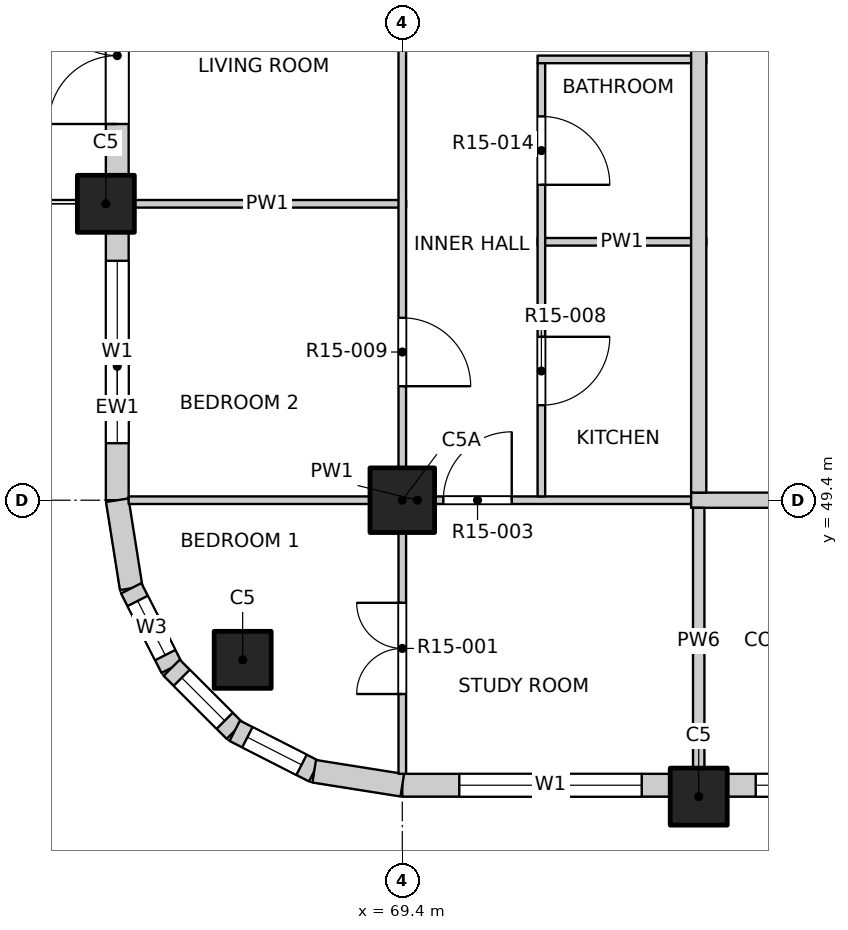
"""IFC4 building model, lengths in metres.
Left out: names, types, materials, properties, quantities, classifications, styles, units other than length and angle.
Written with IfcOpenShell. Run it as: python <this file> out.ifc"""

import sys

from ifc_helpers import new_model, si_unit, direction, frame, frame_2d, origin, origin_2d, place, context, subcontext, project, spatial, rectangle, extrude, element, fill, save


model = new_model("IFC4")
c1 = context("Model", 3, precision=1e-05, world=origin(), true_north=direction((0.0, 1.0)))
c2 = subcontext(c1, "Body", "Model", "MODEL_VIEW")
j1 = project(units=[si_unit("LENGTHUNIT", "METRE"), si_unit("PLANEANGLEUNIT", "RADIAN")], contexts=[c1])
p1 = place(None, origin())
s1 = spatial("IfcSite", under=j1, at=p1, CompositionType="ELEMENT")
p2 = place(p1, origin())
s2 = spatial("IfcBuilding", under=s1, at=p2, CompositionType="ELEMENT")
p3 = place(p2, frame((0.0, 0.0, 158.8)))
s3 = spatial("IfcBuildingStorey", under=s2, at=p3, CompositionType="ELEMENT", Elevation=158.8)
for number, where, z_axis, x_axis in (
    (1, (67.3, 47.3, -0.25), (0.0, 0.0, 1.0), (1.0, 0.0, 0.0)),
    (2, (65.5, 53.3, -0.25), (0.0, 0.0, 1.0), (1.0, 0.0, 0.0)),
    (3, (73.3, 45.5, -0.25), (0.0, 0.0, 1.0), (1.0, 0.0, 0.0)),
):
    element("IfcColumn", number, at=place(p3, frame(where, z_axis=z_axis, x_axis=x_axis)), inside=s3, PredefinedType="COLUMN", context=c2, shape_type="SweptSolid", body=[
        extrude(rectangle(XDim=0.75, YDim=0.75, at=origin_2d()), origin(), (0.0, 0.0, 1.0), 3.4),
    ])
p4 = place(p3, frame((69.4, 49.4, -0.25), z_axis=(0.0, 0.0, 1.0), x_axis=(1.0, 0.0, 0.0)))
e4 = element("IfcColumn", 4, at=p4, inside=s3, PredefinedType="COLUMN", context=c2, shape_type="SweptSolid", body=[
    extrude(rectangle(XDim=0.85, YDim=0.85, at=origin_2d()), origin(), (0.0, 0.0, 1.0), 3.4),
])
p5 = place(p3, frame((69.4, 45.65, 0.0), z_axis=(0.0, 0.0, 1.0), x_axis=(1.0, 0.0, 0.0)))
e5 = element("IfcWall", 5, at=p5, inside=s3, PredefinedType="SOLIDWALL", context=c2, shape_type="SweptSolid", body=[
    extrude(rectangle(XDim=3.525, YDim=0.3, at=frame_2d((1.763, 0.0))), origin(), (0.0, 0.0, 1.0), 2.7),
])
p6 = place(p5, frame((0.75, 0.0, 0.9)))
e6 = element("IfcOpeningElement", 6, at=p6, cuts=e5, PredefinedType="OPENING", context=c2, shape_type="SweptSolid", body=[
    extrude(rectangle(XDim=2.4, YDim=1.8, at=frame_2d((1.2, 0.9))), frame((0.0, 0.16, 0.0), z_axis=(0.0, -1.0, 0.0), x_axis=(1.0, 0.0, 0.0)), (0.0, 0.0, 1.0), 0.32),
])
p7 = place(p3, frame((73.675, 45.65, 0.0), z_axis=(0.0, 0.0, 1.0), x_axis=(1.0, 0.0, 0.0)))
e7 = element("IfcWall", 7, at=p7, inside=s3, PredefinedType="SOLIDWALL", context=c2, shape_type="SweptSolid", body=[
    extrude(rectangle(XDim=7.05, YDim=0.3, at=frame_2d((3.525, 0.0))), origin(), (0.0, 0.0, 1.0), 2.7),
])
p8 = place(p7, frame((0.375, 0.0, 0.9)))
e8 = element("IfcOpeningElement", 8, at=p8, cuts=e7, PredefinedType="OPENING", context=c2, shape_type="SweptSolid", body=[
    extrude(rectangle(XDim=2.4, YDim=1.8, at=frame_2d((1.2, 0.9))), frame((0.0, 0.16, 0.0), z_axis=(0.0, -1.0, 0.0), x_axis=(1.0, 0.0, 0.0)), (0.0, 0.0, 1.0), 0.32),
])
p9 = place(p7, frame((4.275, 0.0, 0.9)))
e9 = element("IfcOpeningElement", 9, at=p9, cuts=e7, PredefinedType="OPENING", context=c2, shape_type="SweptSolid", body=[
    extrude(rectangle(XDim=2.4, YDim=1.8, at=frame_2d((1.2, 0.9))), frame((0.0, 0.16, 0.0), z_axis=(0.0, -1.0, 0.0), x_axis=(1.0, 0.0, 0.0)), (0.0, 0.0, 1.0), 0.32),
])
p10 = place(p3, frame((65.65, 49.4, 0.0), z_axis=(0.0, 0.0, 1.0), x_axis=(0.0, 1.0, 0.0)))
e10 = element("IfcWall", 10, at=p10, inside=s3, PredefinedType="SOLIDWALL", context=c2, shape_type="SweptSolid", body=[
    extrude(rectangle(XDim=3.525, YDim=0.3, at=frame_2d((1.763, 0.0))), origin(), (0.0, 0.0, 1.0), 2.7),
])
p11 = place(p10, frame((0.75, 0.0, 0.9)))
e11 = element("IfcOpeningElement", 11, at=p11, cuts=e10, PredefinedType="OPENING", context=c2, shape_type="SweptSolid", body=[
    extrude(rectangle(XDim=2.4, YDim=1.8, at=frame_2d((1.2, 0.9))), frame((0.0, 0.16, 0.0), z_axis=(0.0, -1.0, 0.0), x_axis=(1.0, 0.0, 0.0)), (0.0, 0.0, 1.0), 0.32),
])
p12 = place(p3, frame((65.65, 53.675, 0.0), z_axis=(0.0, 0.0, 1.0), x_axis=(0.0, 1.0, 0.0)))
e12 = element("IfcWall", 12, at=p12, inside=s3, PredefinedType="SOLIDWALL", context=c2, shape_type="SweptSolid", body=[
    extrude(rectangle(XDim=7.05, YDim=0.3, at=frame_2d((3.525, 0.0))), origin(), (0.0, 0.0, 1.0), 2.7),
])
p13 = place(p12, frame((0.675, 0.0, 0.0)))
e13 = element("IfcOpeningElement", 13, at=p13, cuts=e12, PredefinedType="OPENING", context=c2, shape_type="SweptSolid", body=[
    extrude(rectangle(XDim=1.8, YDim=2.4, at=frame_2d((0.9, 1.2))), frame((0.0, 0.16, 0.0), z_axis=(0.0, -1.0, 0.0), x_axis=(1.0, 0.0, 0.0)), (0.0, 0.0, 1.0), 0.32),
])
p14 = place(p12, frame((4.275, 0.0, 0.9)))
e14 = element("IfcOpeningElement", 14, at=p14, cuts=e12, PredefinedType="OPENING", context=c2, shape_type="SweptSolid", body=[
    extrude(rectangle(XDim=2.4, YDim=1.8, at=frame_2d((1.2, 0.9))), frame((0.0, 0.16, 0.0), z_axis=(0.0, -1.0, 0.0), x_axis=(1.0, 0.0, 0.0)), (0.0, 0.0, 1.0), 0.32),
])
p15 = place(p3, frame((65.65, 49.4, 0.0), z_axis=(0.0, 0.0, 1.0), x_axis=(0.156496880861, -0.987678452879, 0.0)))
e15 = element("IfcWall", 15, at=p15, inside=s3, PredefinedType="SOLIDWALL", context=c2, shape_type="SweptSolid", body=[
    extrude(rectangle(XDim=1.173, YDim=0.3, at=frame_2d((0.586, 0.0))), origin(), (0.0, 0.0, 1.0), 2.7),
])
p16 = place(p3, frame((65.833, 48.241, 0.0), z_axis=(0.0, 0.0, 1.0), x_axis=(0.454025524128, -0.890988677504, 0.0)))
e16 = element("IfcWall", 16, at=p16, inside=s3, PredefinedType="SOLIDWALL", context=c2, shape_type="SweptSolid", body=[
    extrude(rectangle(XDim=1.173, YDim=0.3, at=frame_2d((0.587, 0.0))), origin(), (0.0, 0.0, 1.0), 2.7),
])
p17 = place(p16, frame((0.187, 0.0, 0.9)))
e17 = element("IfcOpeningElement", 17, at=p17, cuts=e16, PredefinedType="OPENING", context=c2, shape_type="SweptSolid", body=[
    extrude(rectangle(XDim=0.8, YDim=1.2, at=frame_2d((0.4, 0.6))), frame((0.0, 0.16, 0.0), z_axis=(0.0, -1.0, 0.0), x_axis=(1.0, 0.0, 0.0)), (0.0, 0.0, 1.0), 0.32),
])
p18 = place(p3, frame((66.366, 47.196, 0.0), z_axis=(0.0, 0.0, 1.0), x_axis=(0.707106781187, -0.707106781187, 0.0)))
e18 = element("IfcWall", 18, at=p18, inside=s3, PredefinedType="SOLIDWALL", context=c2, shape_type="SweptSolid", body=[
    extrude(rectangle(XDim=1.173, YDim=0.3, at=frame_2d((0.586, 0.0))), origin(), (0.0, 0.0, 1.0), 2.7),
])
p19 = place(p18, frame((0.187, 0.0, 0.9)))
e19 = element("IfcOpeningElement", 19, at=p19, cuts=e18, PredefinedType="OPENING", context=c2, shape_type="SweptSolid", body=[
    extrude(rectangle(XDim=0.8, YDim=1.2, at=frame_2d((0.4, 0.6))), frame((0.0, 0.16, 0.0), z_axis=(0.0, -1.0, 0.0), x_axis=(1.0, 0.0, 0.0)), (0.0, 0.0, 1.0), 0.32),
])
p20 = place(p3, frame((67.196, 46.366, 0.0), z_axis=(0.0, 0.0, 1.0), x_axis=(0.890988677504, -0.454025524128, 0.0)))
e20 = element("IfcWall", 20, at=p20, inside=s3, PredefinedType="SOLIDWALL", context=c2, shape_type="SweptSolid", body=[
    extrude(rectangle(XDim=1.173, YDim=0.3, at=frame_2d((0.587, 0.0))), origin(), (0.0, 0.0, 1.0), 2.7),
])
p21 = place(p20, frame((0.187, 0.0, 0.9)))
e21 = element("IfcOpeningElement", 21, at=p21, cuts=e20, PredefinedType="OPENING", context=c2, shape_type="SweptSolid", body=[
    extrude(rectangle(XDim=0.8, YDim=1.2, at=frame_2d((0.4, 0.6))), frame((0.0, 0.16, 0.0), z_axis=(0.0, -1.0, 0.0), x_axis=(1.0, 0.0, 0.0)), (0.0, 0.0, 1.0), 0.32),
])
p22 = place(p3, frame((68.241, 45.833, 0.0), z_axis=(0.0, 0.0, 1.0), x_axis=(0.987678452879, -0.156496880861, 0.0)))
e22 = element("IfcWall", 22, at=p22, inside=s3, PredefinedType="SOLIDWALL", context=c2, shape_type="SweptSolid", body=[
    extrude(rectangle(XDim=1.173, YDim=0.3, at=frame_2d((0.586, 0.0))), origin(), (0.0, 0.0, 1.0), 2.7),
])
p23 = place(p3, frame((65.8, 49.4, 0.0), z_axis=(0.0, 0.0, 1.0), x_axis=(1.0, 0.0, 0.0)))
e23 = element("IfcWall", 23, at=p23, inside=s3, PredefinedType="PARTITIONING", context=c2, shape_type="SweptSolid", body=[
    extrude(rectangle(XDim=7.6, YDim=0.1, at=frame_2d((3.8, 0.0))), origin(), (0.0, 0.0, 1.0), 3.15),
])
p24 = place(p23, frame((4.14, 0.0, 0.0)))
e24 = element("IfcOpeningElement", 24, at=p24, cuts=e23, PredefinedType="OPENING", context=c2, shape_type="SweptSolid", body=[
    extrude(rectangle(XDim=0.9, YDim=2.1, at=frame_2d((0.45, 1.05))), frame((0.0, 0.06, 0.0), z_axis=(0.0, -1.0, 0.0), x_axis=(1.0, 0.0, 0.0)), (0.0, 0.0, 1.0), 0.12),
])
p25 = place(p3, frame((73.2, 49.4, 0.0), z_axis=(0.0, 0.0, 1.0), x_axis=(1.0, 0.0, 0.0)))
e25 = element("IfcWall", 25, at=p25, inside=s3, PredefinedType="PARTITIONING", context=c2, shape_type="SweptSolid", body=[
    extrude(rectangle(XDim=23.6, YDim=0.2, at=frame_2d((11.8, 0.0))), origin(), (0.0, 0.0, 1.0), 3.15),
])
p26 = place(p25, frame((4.525, 0.0, 0.0)))
e26 = element("IfcOpeningElement", 26, at=p26, cuts=e25, PredefinedType="OPENING", context=c2, shape_type="SweptSolid", body=[
    extrude(rectangle(XDim=1.2, YDim=2.1, at=frame_2d((0.6, 1.05))), frame((0.0, 0.11, 0.0), z_axis=(0.0, -1.0, 0.0), x_axis=(1.0, 0.0, 0.0)), (0.0, 0.0, 1.0), 0.22),
])
p27 = place(p25, frame((15.1, 0.0, 0.0)))
e27 = element("IfcOpeningElement", 27, at=p27, cuts=e25, PredefinedType="OPENING", context=c2, shape_type="SweptSolid", body=[
    extrude(rectangle(XDim=1.2, YDim=2.1, at=frame_2d((0.6, 1.05))), frame((0.0, 0.11, 0.0), z_axis=(0.0, -1.0, 0.0), x_axis=(1.0, 0.0, 0.0)), (0.0, 0.0, 1.0), 0.22),
])
p28 = place(p3, frame((71.18, 52.8, 0.0), z_axis=(0.0, 0.0, 1.0), x_axis=(1.0, 0.0, 0.0)))
e28 = element("IfcWall", 28, at=p28, inside=s3, PredefinedType="PARTITIONING", context=c2, shape_type="SweptSolid", body=[
    extrude(rectangle(XDim=2.22, YDim=0.1, at=frame_2d((1.11, 0.0))), origin(), (0.0, 0.0, 1.0), 3.15),
])
p29 = place(p3, frame((65.8, 53.3, 0.0), z_axis=(0.0, 0.0, 1.0), x_axis=(1.0, 0.0, 0.0)))
e29 = element("IfcWall", 29, at=p29, inside=s3, PredefinedType="PARTITIONING", context=c2, shape_type="SweptSolid", body=[
    extrude(rectangle(XDim=3.65, YDim=0.1, at=frame_2d((1.825, 0.0))), origin(), (0.0, 0.0, 1.0), 3.15),
])
p30 = place(p3, frame((71.18, 55.2, 0.0), z_axis=(0.0, 0.0, 1.0), x_axis=(1.0, 0.0, 0.0)))
e30 = element("IfcWall", 30, at=p30, inside=s3, PredefinedType="PARTITIONING", context=c2, shape_type="SweptSolid", body=[
    extrude(rectangle(XDim=2.22, YDim=0.1, at=frame_2d((1.11, 0.0))), origin(), (0.0, 0.0, 1.0), 3.15),
])
p31 = place(p3, frame((69.4, 45.8, 0.0), z_axis=(0.0, 0.0, 1.0), x_axis=(0.0, 1.0, 0.0)))
e31 = element("IfcWall", 31, at=p31, inside=s3, PredefinedType="PARTITIONING", context=c2, shape_type="SweptSolid", body=[
    extrude(rectangle(XDim=38.4, YDim=0.1, at=frame_2d((19.2, 0.0))), origin(), (0.0, 0.0, 1.0), 3.15),
])
p32 = place(p31, frame((1.05, 0.0, 0.0)))
e32 = element("IfcOpeningElement", 32, at=p32, cuts=e31, PredefinedType="OPENING", context=c2, shape_type="SweptSolid", body=[
    extrude(rectangle(XDim=1.2, YDim=2.1, at=frame_2d((0.6, 1.05))), frame((0.0, 0.06, 0.0), z_axis=(0.0, -1.0, 0.0), x_axis=(1.0, 0.0, 0.0)), (0.0, 0.0, 1.0), 0.12),
])
p33 = place(p31, frame((5.1, 0.0, 0.0)))
e33 = element("IfcOpeningElement", 33, at=p33, cuts=e31, PredefinedType="OPENING", context=c2, shape_type="SweptSolid", body=[
    extrude(rectangle(XDim=0.9, YDim=2.1, at=frame_2d((0.45, 1.05))), frame((0.0, 0.06, 0.0), z_axis=(0.0, -1.0, 0.0), x_axis=(1.0, 0.0, 0.0)), (0.0, 0.0, 1.0), 0.12),
])
p34 = place(p31, frame((11.925, 0.0, 0.0)))
e34 = element("IfcOpeningElement", 34, at=p34, cuts=e31, PredefinedType="OPENING", context=c2, shape_type="SweptSolid", body=[
    extrude(rectangle(XDim=1.2, YDim=2.1, at=frame_2d((0.6, 1.05))), frame((0.0, 0.06, 0.0), z_axis=(0.0, -1.0, 0.0), x_axis=(1.0, 0.0, 0.0)), (0.0, 0.0, 1.0), 0.12),
])
p35 = place(p31, frame((16.8, 0.0, 0.0)))
e35 = element("IfcOpeningElement", 35, at=p35, cuts=e31, PredefinedType="OPENING", context=c2, shape_type="SweptSolid", body=[
    extrude(rectangle(XDim=0.9, YDim=2.1, at=frame_2d((0.45, 1.05))), frame((0.0, 0.06, 0.0), z_axis=(0.0, -1.0, 0.0), x_axis=(1.0, 0.0, 0.0)), (0.0, 0.0, 1.0), 0.12),
])
p36 = place(p31, frame((22.5, 0.0, 0.0)))
e36 = element("IfcOpeningElement", 36, at=p36, cuts=e31, PredefinedType="OPENING", context=c2, shape_type="SweptSolid", body=[
    extrude(rectangle(XDim=1.2, YDim=2.1, at=frame_2d((0.6, 1.05))), frame((0.0, 0.06, 0.0), z_axis=(0.0, -1.0, 0.0), x_axis=(1.0, 0.0, 0.0)), (0.0, 0.0, 1.0), 0.12),
])
p37 = place(p31, frame((28.5, 0.0, 0.0)))
e37 = element("IfcOpeningElement", 37, at=p37, cuts=e31, PredefinedType="OPENING", context=c2, shape_type="SweptSolid", body=[
    extrude(rectangle(XDim=0.9, YDim=2.1, at=frame_2d((0.45, 1.05))), frame((0.0, 0.06, 0.0), z_axis=(0.0, -1.0, 0.0), x_axis=(1.0, 0.0, 0.0)), (0.0, 0.0, 1.0), 0.12),
])
p38 = place(p31, frame((32.4, 0.0, 0.0)))
e38 = element("IfcOpeningElement", 38, at=p38, cuts=e31, PredefinedType="OPENING", context=c2, shape_type="SweptSolid", body=[
    extrude(rectangle(XDim=0.9, YDim=2.1, at=frame_2d((0.45, 1.05))), frame((0.0, 0.06, 0.0), z_axis=(0.0, -1.0, 0.0), x_axis=(1.0, 0.0, 0.0)), (0.0, 0.0, 1.0), 0.12),
])
p39 = place(p31, frame((36.15, 0.0, 0.0)))
e39 = element("IfcOpeningElement", 39, at=p39, cuts=e31, PredefinedType="OPENING", context=c2, shape_type="SweptSolid", body=[
    extrude(rectangle(XDim=1.2, YDim=2.1, at=frame_2d((0.6, 1.05))), frame((0.0, 0.06, 0.0), z_axis=(0.0, -1.0, 0.0), x_axis=(1.0, 0.0, 0.0)), (0.0, 0.0, 1.0), 0.12),
])
p40 = place(p3, frame((71.23, 49.45, 0.0), z_axis=(0.0, 0.0, 1.0), x_axis=(0.0, 1.0, 0.0)))
e40 = element("IfcWall", 40, at=p40, inside=s3, PredefinedType="PARTITIONING", context=c2, shape_type="SweptSolid", body=[
    extrude(rectangle(XDim=5.7, YDim=0.1, at=frame_2d((2.85, 0.0))), origin(), (0.0, 0.0, 1.0), 3.15),
])
p41 = place(p40, frame((1.2, 0.0, 0.0)))
e41 = element("IfcOpeningElement", 41, at=p41, cuts=e40, PredefinedType="OPENING", context=c2, shape_type="SweptSolid", body=[
    extrude(rectangle(XDim=0.9, YDim=2.1, at=frame_2d((0.45, 1.05))), frame((0.0, 0.06, 0.0), z_axis=(0.0, -1.0, 0.0), x_axis=(1.0, 0.0, 0.0)), (0.0, 0.0, 1.0), 0.12),
])
p42 = place(p40, frame((4.1, 0.0, 0.0)))
e42 = element("IfcOpeningElement", 42, at=p42, cuts=e40, PredefinedType="OPENING", context=c2, shape_type="SweptSolid", body=[
    extrude(rectangle(XDim=0.9, YDim=2.1, at=frame_2d((0.45, 1.05))), frame((0.0, 0.06, 0.0), z_axis=(0.0, -1.0, 0.0), x_axis=(1.0, 0.0, 0.0)), (0.0, 0.0, 1.0), 0.12),
])
p43 = place(p3, frame((73.3, 45.8, 0.0), z_axis=(0.0, 0.0, 1.0), x_axis=(0.0, 1.0, 0.0)))
e43 = element("IfcWall", 43, at=p43, inside=s3, PredefinedType="PARTITIONING", context=c2, shape_type="SweptSolid", body=[
    extrude(rectangle(XDim=3.5, YDim=0.15, at=frame_2d((1.75, 0.0))), origin(), (0.0, 0.0, 1.0), 3.15),
])
p44 = place(p3, frame((73.3, 49.5, 0.0), z_axis=(0.0, 0.0, 1.0), x_axis=(0.0, 1.0, 0.0)))
e44 = element("IfcWall", 44, at=p44, inside=s3, PredefinedType="PARTITIONING", context=c2, shape_type="SweptSolid", body=[
    extrude(rectangle(XDim=34.7, YDim=0.2, at=frame_2d((17.35, 0.0))), origin(), (0.0, 0.0, 1.0), 3.15),
])
p45 = place(p44, frame((6.975, 0.0, 0.0)))
e45 = element("IfcOpeningElement", 45, at=p45, cuts=e44, PredefinedType="OPENING", context=c2, shape_type="SweptSolid", body=[
    extrude(rectangle(XDim=1.0, YDim=2.1, at=frame_2d((0.5, 1.05))), frame((0.0, 0.11, 0.0), z_axis=(0.0, -1.0, 0.0), x_axis=(1.0, 0.0, 0.0)), (0.0, 0.0, 1.0), 0.22),
])
p46 = place(p44, frame((19.075, 0.0, 0.0)))
e46 = element("IfcOpeningElement", 46, at=p46, cuts=e44, PredefinedType="OPENING", context=c2, shape_type="SweptSolid", body=[
    extrude(rectangle(XDim=1.0, YDim=2.1, at=frame_2d((0.5, 1.05))), frame((0.0, 0.11, 0.0), z_axis=(0.0, -1.0, 0.0), x_axis=(1.0, 0.0, 0.0)), (0.0, 0.0, 1.0), 0.22),
])
p47 = place(p44, frame((27.675, 0.0, 0.0)))
e47 = element("IfcOpeningElement", 47, at=p47, cuts=e44, PredefinedType="OPENING", context=c2, shape_type="SweptSolid", body=[
    extrude(rectangle(XDim=1.0, YDim=2.1, at=frame_2d((0.5, 1.05))), frame((0.0, 0.11, 0.0), z_axis=(0.0, -1.0, 0.0), x_axis=(1.0, 0.0, 0.0)), (0.0, 0.0, 1.0), 0.22),
])
p48 = place(p6, origin())
e48 = element("IfcWindow", 48, at=p48, inside=s3, PartitioningType="DOUBLE_PANEL_VERTICAL", PredefinedType="WINDOW", context=c2, shape_type="SweptSolid", body=[
    extrude(rectangle(XDim=2.4, YDim=1.8, at=frame_2d((1.2, 0.9))), frame((0.0, 0.03, 0.0), z_axis=(0.0, -1.0, 0.0), x_axis=(1.0, 0.0, 0.0)), (0.0, 0.0, 1.0), 0.06),
])
fill(e6, e48)
p49 = place(p8, origin())
e49 = element("IfcWindow", 49, at=p49, inside=s3, PartitioningType="DOUBLE_PANEL_VERTICAL", PredefinedType="WINDOW", context=c2, shape_type="SweptSolid", body=[
    extrude(rectangle(XDim=2.4, YDim=1.8, at=frame_2d((1.2, 0.9))), frame((0.0, 0.03, 0.0), z_axis=(0.0, -1.0, 0.0), x_axis=(1.0, 0.0, 0.0)), (0.0, 0.0, 1.0), 0.06),
])
fill(e8, e49)
p50 = place(p11, origin())
e50 = element("IfcWindow", 50, at=p50, inside=s3, PartitioningType="DOUBLE_PANEL_VERTICAL", PredefinedType="WINDOW", context=c2, shape_type="SweptSolid", body=[
    extrude(rectangle(XDim=2.4, YDim=1.8, at=frame_2d((1.2, 0.9))), frame((0.0, 0.03, 0.0), z_axis=(0.0, -1.0, 0.0), x_axis=(1.0, 0.0, 0.0)), (0.0, 0.0, 1.0), 0.06),
])
fill(e11, e50)
p51 = place(p13, origin())
e51 = element("IfcDoor", 51, at=p51, inside=s3, OperationType="DOUBLE_DOOR_SINGLE_SWING", PredefinedType="DOOR", context=c2, shape_type="SweptSolid", body=[
    extrude(rectangle(XDim=1.8, YDim=2.4, at=frame_2d((0.9, 1.2))), frame((0.0, 0.025, 0.0), z_axis=(0.0, -1.0, 0.0), x_axis=(1.0, 0.0, 0.0)), (0.0, 0.0, 1.0), 0.05),
])
fill(e13, e51)
p52 = place(p17, origin())
e52 = element("IfcWindow", 52, at=p52, inside=s3, PartitioningType="SINGLE_PANEL", PredefinedType="WINDOW", context=c2, shape_type="SweptSolid", body=[
    extrude(rectangle(XDim=0.8, YDim=1.2, at=frame_2d((0.4, 0.6))), frame((0.0, 0.03, 0.0), z_axis=(0.0, -1.0, 0.0), x_axis=(1.0, 0.0, 0.0)), (0.0, 0.0, 1.0), 0.06),
])
fill(e17, e52)
p53 = place(p19, origin())
e53 = element("IfcWindow", 53, at=p53, inside=s3, PartitioningType="SINGLE_PANEL", PredefinedType="WINDOW", context=c2, shape_type="SweptSolid", body=[
    extrude(rectangle(XDim=0.8, YDim=1.2, at=frame_2d((0.4, 0.6))), frame((0.0, 0.03, 0.0), z_axis=(0.0, -1.0, 0.0), x_axis=(1.0, 0.0, 0.0)), (0.0, 0.0, 1.0), 0.06),
])
fill(e19, e53)
p54 = place(p21, origin())
e54 = element("IfcWindow", 54, at=p54, inside=s3, PartitioningType="SINGLE_PANEL", PredefinedType="WINDOW", context=c2, shape_type="SweptSolid", body=[
    extrude(rectangle(XDim=0.8, YDim=1.2, at=frame_2d((0.4, 0.6))), frame((0.0, 0.03, 0.0), z_axis=(0.0, -1.0, 0.0), x_axis=(1.0, 0.0, 0.0)), (0.0, 0.0, 1.0), 0.06),
])
fill(e21, e54)
p55 = place(p32, origin())
e55 = element("IfcDoor", 55, at=p55, inside=s3, OperationType="DOUBLE_DOOR_SINGLE_SWING", PredefinedType="DOOR", context=c2, shape_type="SweptSolid", body=[
    extrude(rectangle(XDim=1.2, YDim=2.1, at=frame_2d((0.6, 1.05))), frame((0.0, 0.025, 0.0), z_axis=(0.0, -1.0, 0.0), x_axis=(1.0, 0.0, 0.0)), (0.0, 0.0, 1.0), 0.05),
])
fill(e32, e55)
p56 = place(p24, origin())
e56 = element("IfcDoor", 56, at=p56, inside=s3, OperationType="SINGLE_SWING_RIGHT", PredefinedType="DOOR", context=c2, shape_type="SweptSolid", body=[
    extrude(rectangle(XDim=0.9, YDim=2.1, at=frame_2d((0.45, 1.05))), frame((0.0, 0.025, 0.0), z_axis=(0.0, -1.0, 0.0), x_axis=(1.0, 0.0, 0.0)), (0.0, 0.0, 1.0), 0.05),
])
fill(e24, e56)
p57 = place(p41, origin())
e57 = element("IfcDoor", 57, at=p57, inside=s3, OperationType="SINGLE_SWING_LEFT", PredefinedType="DOOR", context=c2, shape_type="SweptSolid", body=[
    extrude(rectangle(XDim=0.9, YDim=2.1, at=frame_2d((0.45, 1.05))), frame((0.0, 0.025, 0.0), z_axis=(0.0, -1.0, 0.0), x_axis=(1.0, 0.0, 0.0)), (0.0, 0.0, 1.0), 0.05),
])
fill(e41, e57)
p58 = place(p33, origin())
e58 = element("IfcDoor", 58, at=p58, inside=s3, OperationType="SINGLE_SWING_RIGHT", PredefinedType="DOOR", context=c2, shape_type="SweptSolid", body=[
    extrude(rectangle(XDim=0.9, YDim=2.1, at=frame_2d((0.45, 1.05))), frame((0.0, 0.025, 0.0), z_axis=(0.0, -1.0, 0.0), x_axis=(1.0, 0.0, 0.0)), (0.0, 0.0, 1.0), 0.05),
])
fill(e33, e58)
p59 = place(p42, origin())
e59 = element("IfcDoor", 59, at=p59, inside=s3, OperationType="SINGLE_SWING_RIGHT", PredefinedType="DOOR", context=c2, shape_type="SweptSolid", body=[
    extrude(rectangle(XDim=0.9, YDim=2.1, at=frame_2d((0.45, 1.05))), frame((0.0, 0.025, 0.0), z_axis=(0.0, -1.0, 0.0), x_axis=(1.0, 0.0, 0.0)), (0.0, 0.0, 1.0), 0.05),
])
fill(e42, e59)
save(model, sys.argv[1])
